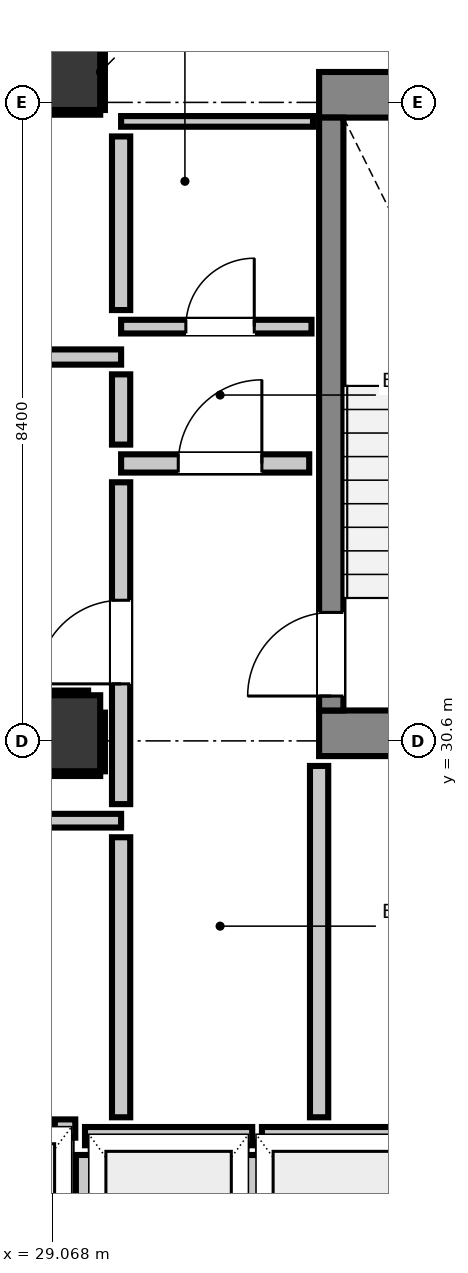
"""IFC4 building model, lengths in metres.
Left out: names, types, materials, properties, quantities, classifications, styles, units other than length and angle.
Written with IfcOpenShell. Run it as: python <this file> out.ifc"""

import sys

from ifc_helpers import new_model, si_unit, direction, frame, frame_2d, origin, origin_2d, place, context, subcontext, project, spatial, rectangle, extrude, element, fill, save


model = new_model("IFC4")
c1 = context("Model", 3, precision=1e-05, world=origin(), true_north=direction((0.0, 1.0)))
c2 = subcontext(c1, "Body", "Model", "MODEL_VIEW")
j1 = project(units=[si_unit("LENGTHUNIT", "METRE"), si_unit("PLANEANGLEUNIT", "RADIAN")], contexts=[c1])
p1 = place(None, origin())
s1 = spatial("IfcSite", under=j1, at=p1, CompositionType="ELEMENT")
p2 = place(p1, origin())
s2 = spatial("IfcBuilding", under=s1, at=p2, CompositionType="ELEMENT")
p3 = place(p2, frame((0.0, 0.0, 35.28)))
s3 = spatial("IfcBuildingStorey", under=s2, at=p3, CompositionType="ELEMENT", Elevation=35.28)
p4 = place(p3, frame((29.2, 39.4, 0.0), z_axis=(0.0, 0.0, 1.0), x_axis=(1.0, 0.0, 0.0)))
e1 = element("IfcColumn", 1, at=p4, inside=s3, PredefinedType="COLUMN", context=c2, shape_type="SweptSolid", body=[
    extrude(rectangle(XDim=1.0, YDim=1.0, at=origin_2d()), origin(), (0.0, 0.0, 1.0), 3.32),
])
p5 = place(p3, frame((32.58, 39.1, 0.0), z_axis=(0.0, 0.0, 1.0), x_axis=(1.0, 0.0, 0.0)))
e2 = element("IfcWall", 2, at=p5, inside=s3, PredefinedType="SHEAR", context=c2, shape_type="SweptSolid", body=[
    extrude(rectangle(XDim=4.08, YDim=0.6, at=frame_2d((2.04, 0.0))), origin(), (0.0, 0.0, 1.0), 3.32),
])
p6 = place(p3, frame((32.58, 30.7, 0.0), z_axis=(0.0, 0.0, 1.0), x_axis=(1.0, 0.0, 0.0)))
e3 = element("IfcWall", 3, at=p6, inside=s3, PredefinedType="SHEAR", context=c2, shape_type="SweptSolid", body=[
    extrude(rectangle(XDim=3.415, YDim=0.6, at=frame_2d((1.708, 0.0))), origin(), (0.0, 0.0, 1.0), 3.32),
])
p7 = place(p3, frame((32.74, 31.0, 0.0), z_axis=(0.0, 0.0, 1.0), x_axis=(0.0, 1.0, 0.0)))
e4 = element("IfcWall", 4, at=p7, inside=s3, PredefinedType="SHEAR", context=c2, shape_type="SweptSolid", body=[
    extrude(rectangle(XDim=7.8, YDim=0.32, at=frame_2d((3.9, 0.0))), origin(), (0.0, 0.0, 1.0), 3.32),
])
p8 = place(p7, frame((0.19, 0.0, 0.0)))
e5 = element("IfcOpeningElement", 5, at=p8, cuts=e4, PredefinedType="OPENING", context=c2, shape_type="SweptSolid", body=[
    extrude(rectangle(XDim=1.1, YDim=2.15, at=frame_2d((0.55, 1.075))), frame((0.0, 0.17, 0.0), z_axis=(0.0, -1.0, 0.0), x_axis=(1.0, 0.0, 0.0)), (0.0, 0.0, 1.0), 0.34),
])
p9 = place(p3, frame((29.2, 30.7, 0.0), z_axis=(0.0, 0.0, 1.0), x_axis=(1.0, 0.0, 0.0)))
e6 = element("IfcColumn", 6, at=p9, inside=s3, PredefinedType="COLUMN", context=c2, shape_type="SweptSolid", body=[
    extrude(rectangle(XDim=1.0, YDim=1.0, at=origin_2d()), origin(), (0.0, 0.0, 1.0), 3.32),
])
p10 = place(p3, frame((29.5, 25.4, 0.0), z_axis=(0.0, 0.0, 1.0), x_axis=(1.0, 0.0, 0.0)))
e7 = element("IfcWall", 7, at=p10, inside=s3, PredefinedType="PARTITIONING", context=c2, shape_type="SweptSolid", body=[
    extrude(rectangle(XDim=2.2, YDim=0.24, at=frame_2d((1.1, 0.0))), origin(), (0.0, 0.0, 1.0), 3.06),
])
p11 = place(p3, frame((29.5, 22.632, 0.0), z_axis=(0.0, 0.0, 1.0), x_axis=(0.0, 1.0, 0.0)))
e8 = element("IfcWall", 8, at=p11, inside=s3, PredefinedType="PARTITIONING", context=c2, shape_type="SweptSolid", body=[
    extrude(rectangle(XDim=2.52, YDim=0.24, at=frame_2d((1.26, 0.0))), origin(), (0.0, 0.0, 1.0), 2.295),
])
p12 = place(p3, frame((31.7, 22.73, 0.0), z_axis=(0.0, 0.0, 1.0), x_axis=(0.0, 1.0, 0.0)))
e9 = element("IfcWall", 9, at=p12, inside=s3, PredefinedType="PARTITIONING", context=c2, shape_type="SweptSolid", body=[
    extrude(rectangle(XDim=2.422, YDim=0.24, at=frame_2d((1.211, 0.0))), origin(), (0.0, 0.0, 1.0), 3.06),
])
p13 = place(p3, frame((31.828, 25.4, 0.0), z_axis=(0.0, 0.0, 1.0), x_axis=(1.0, 0.0, 0.0)))
e10 = element("IfcWall", 10, at=p13, inside=s3, PredefinedType="PARTITIONING", context=c2, shape_type="SweptSolid", body=[
    extrude(rectangle(XDim=2.072, YDim=0.24, at=frame_2d((1.036, 0.0))), origin(), (0.0, 0.0, 1.0), 3.06),
])
p14 = place(p3, frame((29.103, 25.5, 0.0), z_axis=(0.0, 0.0, 1.0), x_axis=(1.0, 0.0, 0.0)))
e11 = element("IfcWall", 11, at=p14, inside=s3, PredefinedType="PARTITIONING", context=c2, shape_type="SweptSolid", body=[
    extrude(rectangle(XDim=0.269, YDim=0.24, at=frame_2d((0.135, 0.0))), origin(), (0.0, 0.0, 1.0), 3.06),
])
p15 = place(p3, frame((29.975, 34.25, 0.0), z_axis=(0.0, 0.0, 1.0), x_axis=(1.0, 0.0, 0.0)))
e12 = element("IfcWall", 12, at=p15, inside=s3, PredefinedType="PARTITIONING", context=c2, shape_type="SweptSolid", body=[
    extrude(rectangle(XDim=2.475, YDim=0.24, at=frame_2d((1.237, 0.0))), origin(), (0.0, 0.0, 1.0), 3.06),
])
p16 = place(p15, frame((0.752, 0.0, 0.0)))
e13 = element("IfcOpeningElement", 13, at=p16, cuts=e12, PredefinedType="OPENING", context=c2, shape_type="SweptSolid", body=[
    extrude(rectangle(XDim=1.1, YDim=2.15, at=frame_2d((0.55, 1.075))), frame((0.0, 0.13, 0.0), z_axis=(0.0, -1.0, 0.0), x_axis=(1.0, 0.0, 0.0)), (0.0, 0.0, 1.0), 0.26),
])
p17 = place(p3, frame((28.604, 35.65, 0.0), z_axis=(0.0, 0.0, 1.0), x_axis=(1.0, 0.0, 0.0)))
e14 = element("IfcWall", 14, at=p17, inside=s3, PredefinedType="PARTITIONING", context=c2, shape_type="SweptSolid", body=[
    extrude(rectangle(XDim=1.371, YDim=0.2, at=frame_2d((0.686, 0.0))), origin(), (0.0, 0.0, 1.0), 3.06),
])
p18 = place(p3, frame((20.65, 29.55, 0.0), z_axis=(0.0, 0.0, 1.0), x_axis=(1.0, 0.0, 0.0)))
e15 = element("IfcWall", 15, at=p18, inside=s3, PredefinedType="PARTITIONING", context=c2, shape_type="SweptSolid", body=[
    extrude(rectangle(XDim=9.325, YDim=0.18, at=frame_2d((4.663, 0.0))), origin(), (0.0, 0.0, 1.0), 3.06),
])
p19 = place(p3, frame((29.975, 36.05, 0.0), z_axis=(0.0, 0.0, 1.0), x_axis=(1.0, 0.0, 0.0)))
e16 = element("IfcWall", 16, at=p19, inside=s3, PredefinedType="PARTITIONING", context=c2, shape_type="SweptSolid", body=[
    extrude(rectangle(XDim=2.505, YDim=0.18, at=frame_2d((1.252, 0.0))), origin(), (0.0, 0.0, 1.0), 3.06),
])
p20 = place(p19, frame((0.852, 0.0, 0.0)))
e17 = element("IfcOpeningElement", 17, at=p20, cuts=e16, PredefinedType="OPENING", context=c2, shape_type="SweptSolid", body=[
    extrude(rectangle(XDim=0.9, YDim=2.1, at=frame_2d((0.45, 1.05))), frame((0.0, 0.1, 0.0), z_axis=(0.0, -1.0, 0.0), x_axis=(1.0, 0.0, 0.0)), (0.0, 0.0, 1.0), 0.2),
])
p21 = place(p3, frame((29.975, 38.75, 0.0), z_axis=(0.0, 0.0, 1.0), x_axis=(1.0, 0.0, 0.0)))
e18 = element("IfcWall", 18, at=p21, inside=s3, PredefinedType="PARTITIONING", context=c2, shape_type="SweptSolid", body=[
    extrude(rectangle(XDim=2.525, YDim=0.14, at=frame_2d((1.262, 0.0))), origin(), (0.0, 0.0, 1.0), 3.06),
])
p22 = place(p3, frame((29.975, 25.648, 0.0), z_axis=(0.0, 0.0, 1.0), x_axis=(0.0, 1.0, 0.0)))
e19 = element("IfcWall", 19, at=p22, inside=s3, PredefinedType="PARTITIONING", context=c2, shape_type="SweptSolid", body=[
    extrude(rectangle(XDim=3.684, YDim=0.24, at=frame_2d((1.842, 0.0))), origin(), (0.0, 0.0, 1.0), 3.06),
])
p23 = place(p3, frame((29.975, 29.768, 0.0), z_axis=(0.0, 0.0, 1.0), x_axis=(0.0, 1.0, 0.0)))
e20 = element("IfcWall", 20, at=p23, inside=s3, PredefinedType="PARTITIONING", context=c2, shape_type="SweptSolid", body=[
    extrude(rectangle(XDim=4.234, YDim=0.24, at=frame_2d((2.117, 0.0))), origin(), (0.0, 0.0, 1.0), 3.06),
])
p24 = place(p23, frame((1.582, 0.0, 0.0)))
e21 = element("IfcOpeningElement", 21, at=p24, cuts=e20, PredefinedType="OPENING", context=c2, shape_type="SweptSolid", body=[
    extrude(rectangle(XDim=1.1, YDim=2.15, at=frame_2d((0.55, 1.075))), frame((0.0, 0.13, 0.0), z_axis=(0.0, -1.0, 0.0), x_axis=(1.0, 0.0, 0.0)), (0.0, 0.0, 1.0), 0.26),
])
p25 = place(p3, frame((29.975, 34.498, 0.0), z_axis=(0.0, 0.0, 1.0), x_axis=(0.0, 1.0, 0.0)))
e22 = element("IfcWall", 22, at=p25, inside=s3, PredefinedType="PARTITIONING", context=c2, shape_type="SweptSolid", body=[
    extrude(rectangle(XDim=0.924, YDim=0.24, at=frame_2d((0.462, 0.0))), origin(), (0.0, 0.0, 1.0), 3.06),
])
p26 = place(p3, frame((29.975, 36.268, 0.0), z_axis=(0.0, 0.0, 1.0), x_axis=(0.0, 1.0, 0.0)))
e23 = element("IfcWall", 23, at=p26, inside=s3, PredefinedType="PARTITIONING", context=c2, shape_type="SweptSolid", body=[
    extrude(rectangle(XDim=2.284, YDim=0.24, at=frame_2d((1.142, 0.0))), origin(), (0.0, 0.0, 1.0), 3.06),
])
p27 = place(p3, frame((32.58, 25.648, 0.0), z_axis=(0.0, 0.0, 1.0), x_axis=(0.0, 1.0, 0.0)))
e24 = element("IfcWall", 24, at=p27, inside=s3, PredefinedType="PARTITIONING", context=c2, shape_type="SweptSolid", body=[
    extrude(rectangle(XDim=4.622, YDim=0.24, at=frame_2d((2.311, 0.0))), origin(), (0.0, 0.0, 1.0), 3.06),
])
p28 = place(p3, frame((28.71, 38.868, 0.0), z_axis=(0.0, 0.0, 1.0), x_axis=(1.0, 0.0, 0.0)))
e25 = element("IfcWall", 25, at=p28, inside=s3, PredefinedType="PARTITIONING", context=c2, shape_type="SweptSolid", body=[
    extrude(rectangle(XDim=0.99, YDim=0.06, at=frame_2d((0.495, 0.0))), origin(), (0.0, 0.0, 1.0), 1.45),
])
for number, where, z_axis, x_axis in (
    (26, (29.732, 38.9, 0.0), (0.0, 0.0, 1.0), (0.0, 1.0, 0.0)),
    (27, (28.7, 30.168, 0.0), (0.0, 0.0, 1.0), (1.0, 0.0, 0.0)),
):
    element("IfcWall", number, at=place(p3, frame(where, z_axis=z_axis, x_axis=x_axis)), inside=s3, PredefinedType="PARTITIONING", context=c2, shape_type="SweptSolid", body=[
        extrude(rectangle(XDim=1.0, YDim=0.06, at=frame_2d((0.5, 0.0))), origin(), (0.0, 0.0, 1.0), 1.45),
    ])
p29 = place(p3, frame((28.7, 31.232, 0.0), z_axis=(0.0, 0.0, 1.0), x_axis=(1.0, 0.0, 0.0)))
e28 = element("IfcWall", 28, at=p29, inside=s3, PredefinedType="PARTITIONING", context=c2, shape_type="SweptSolid", body=[
    extrude(rectangle(XDim=0.841, YDim=0.06, at=frame_2d((0.42, 0.0))), origin(), (0.0, 0.0, 1.0), 1.45),
])
p30 = place(p3, frame((29.732, 30.2, 0.0), z_axis=(0.0, 0.0, 1.0), x_axis=(0.0, 1.0, 0.0)))
e29 = element("IfcWall", 29, at=p30, inside=s3, PredefinedType="PARTITIONING", context=c2, shape_type="SweptSolid", body=[
    extrude(rectangle(XDim=0.772, YDim=0.06, at=frame_2d((0.386, 0.0))), origin(), (0.0, 0.0, 1.0), 1.45),
])
p31 = place(p8, origin())
e30 = element("IfcDoor", 30, at=p31, inside=s3, OperationType="SINGLE_SWING_LEFT", PredefinedType="DOOR", context=c2, shape_type="SweptSolid", body=[
    extrude(rectangle(XDim=1.1, YDim=2.15, at=frame_2d((0.55, 1.075))), frame((0.0, 0.025, 0.0), z_axis=(0.0, -1.0, 0.0), x_axis=(1.0, 0.0, 0.0)), (0.0, 0.0, 1.0), 0.05),
])
fill(e5, e30)
p32 = place(p24, origin())
e31 = element("IfcDoor", 31, at=p32, inside=s3, OperationType="SINGLE_SWING_LEFT", PredefinedType="DOOR", context=c2, shape_type="SweptSolid", body=[
    extrude(rectangle(XDim=1.1, YDim=2.15, at=frame_2d((0.55, 1.075))), frame((0.0, 0.025, 0.0), z_axis=(0.0, -1.0, 0.0), x_axis=(1.0, 0.0, 0.0)), (0.0, 0.0, 1.0), 0.05),
])
fill(e21, e31)
p33 = place(p16, origin())
e32 = element("IfcDoor", 32, at=p33, inside=s3, OperationType="SINGLE_SWING_RIGHT", PredefinedType="DOOR", context=c2, shape_type="SweptSolid", body=[
    extrude(rectangle(XDim=1.1, YDim=2.15, at=frame_2d((0.55, 1.075))), frame((0.0, 0.025, 0.0), z_axis=(0.0, -1.0, 0.0), x_axis=(1.0, 0.0, 0.0)), (0.0, 0.0, 1.0), 0.05),
])
fill(e13, e32)
p34 = place(p20, origin())
e33 = element("IfcDoor", 33, at=p34, inside=s3, OperationType="SINGLE_SWING_RIGHT", PredefinedType="DOOR", context=c2, shape_type="SweptSolid", body=[
    extrude(rectangle(XDim=0.9, YDim=2.1, at=frame_2d((0.45, 1.05))), frame((0.0, 0.025, 0.0), z_axis=(0.0, -1.0, 0.0), x_axis=(1.0, 0.0, 0.0)), (0.0, 0.0, 1.0), 0.05),
])
fill(e17, e33)
save(model, sys.argv[1])
